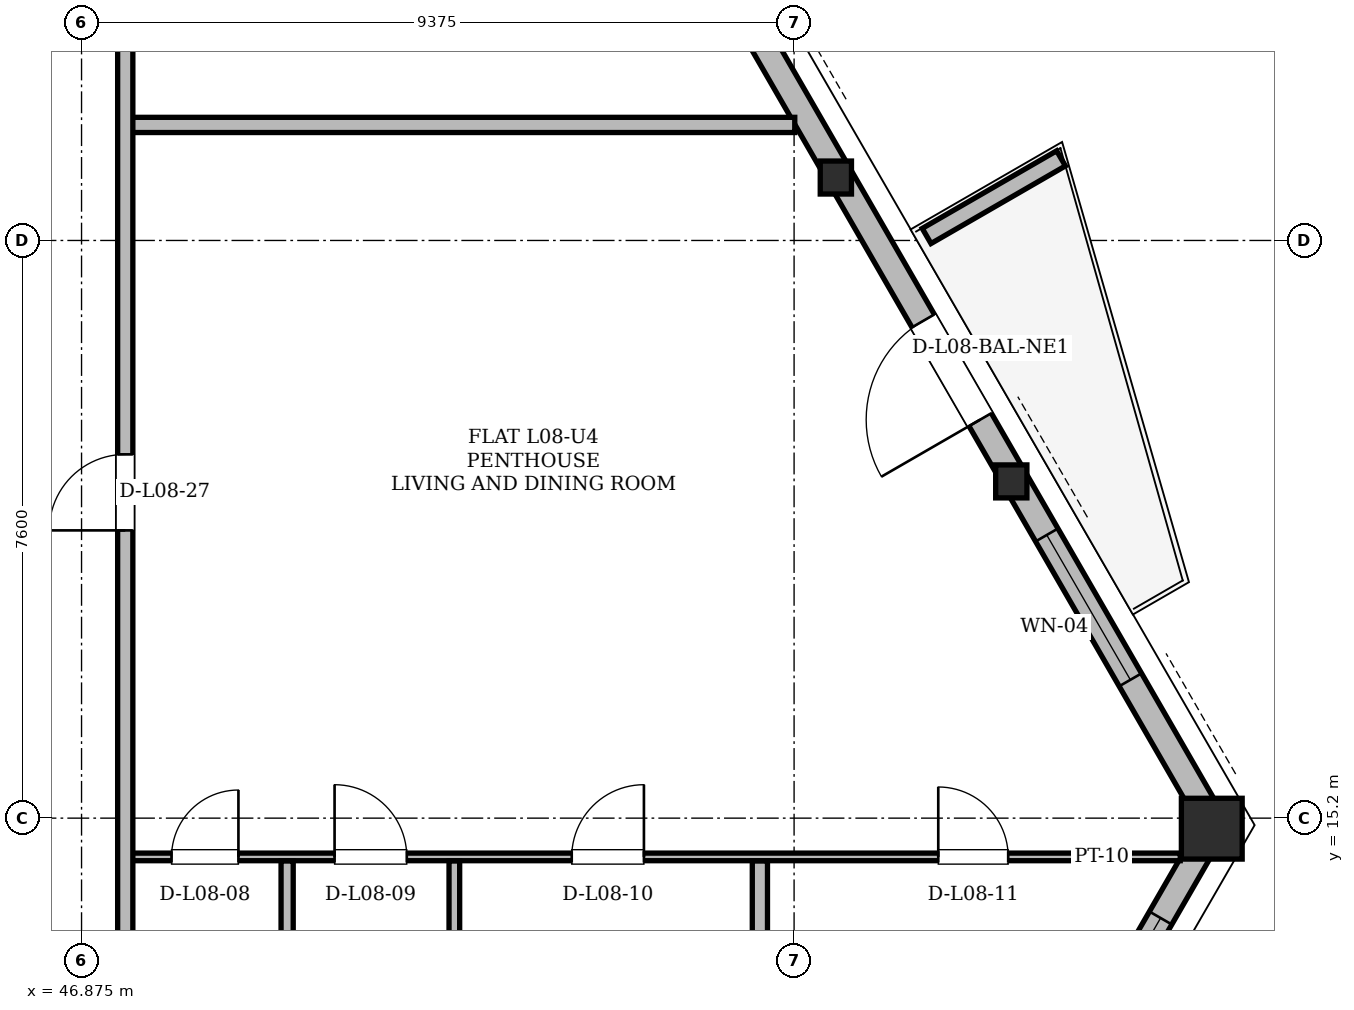
"""IFC4 building model, lengths in metres.
Left out: names, types, materials, properties, quantities, classifications, styles, units other than length and angle.
Written with IfcOpenShell. Run it as: python <this file> out.ifc"""

import sys

from ifc_helpers import new_model, si_unit, direction, frame, frame_2d, origin, origin_2d, place, context, subcontext, project, spatial, polyline, rectangle, hollow_rectangle, i_section, outline, extrude, element, fill, save


model = new_model("IFC4")
c1 = context("Model", 3, precision=1e-05, world=origin(), true_north=direction((0.0, 1.0)))
c2 = subcontext(c1, "Body", "Model", "MODEL_VIEW")
j1 = project(units=[si_unit("LENGTHUNIT", "METRE"), si_unit("PLANEANGLEUNIT", "RADIAN")], contexts=[c1])
p1 = place(None, origin())
s1 = spatial("IfcSite", under=j1, at=p1, CompositionType="ELEMENT")
p2 = place(p1, origin())
s2 = spatial("IfcBuilding", under=s1, at=p2, CompositionType="ELEMENT")
p3 = place(p2, frame((0.0, 0.0, 34.5)))
s3 = spatial("IfcBuildingStorey", under=s2, at=p3, CompositionType="ELEMENT", Elevation=34.5)
p4 = place(p3, frame((61.778, 15.108, 0.004), z_axis=(-0.018142917842, -0.026229087217, 0.999491305373), x_axis=(0.822422232235, -0.568877554422, 0.0)))
e1 = element("IfcColumn", 1, at=p4, inside=s3, PredefinedType="COLUMN", context=c2, shape_type="SweptSolid", body=[
    extrude(hollow_rectangle(XDim=0.8, YDim=0.8, WallThickness=0.065, at=origin_2d()), origin(), (0.0, 0.0, 1.0), 3.593),
])
p5 = place(p3, frame((59.144, 19.67, 0.004), z_axis=(-0.020318381204, -0.022424969221, 0.999542037205), x_axis=(0.741056784611, -0.67144235939, 0.0)))
e2 = element("IfcColumn", 2, at=p5, inside=s3, PredefinedType="COLUMN", context=c2, shape_type="SweptSolid", body=[
    extrude(i_section(OverallWidth=0.411, OverallDepth=0.434, WebThickness=0.036, FlangeThickness=0.057, at=origin_2d()), origin(), (0.0, 0.0, 1.0), 3.593),
])
p6 = place(p3, frame((56.84, 23.662, 0.004), z_axis=(-0.022221713768, -0.019163679763, 0.999569381692), x_axis=(0.653077047348, -0.757291469797, 0.0)))
e3 = element("IfcColumn", 3, at=p6, inside=s3, PredefinedType="COLUMN", context=c2, shape_type="SweptSolid", body=[
    extrude(i_section(OverallWidth=0.411, OverallDepth=0.434, WebThickness=0.036, FlangeThickness=0.057, at=origin_2d()), origin(), (0.0, 0.0, 1.0), 3.593),
])
p7 = place(p3, frame((53.962, 1.57, 0.0), z_axis=(0.0, 0.0, 1.0), x_axis=(0.499997339613, 0.866026939754, 0.0)))
e4 = element("IfcWall", 4, at=p7, inside=s3, PredefinedType="SOLIDWALL", context=c2, shape_type="SweptSolid", body=[
    extrude(rectangle(XDim=15.632, YDim=0.34, at=frame_2d((7.816, 0.0))), origin(), (0.0, 0.0, 1.0), 2.494),
])
p8 = place(p7, frame((13.371, 0.0, 1.28)))
e5 = element("IfcOpeningElement", 5, at=p8, cuts=e4, PredefinedType="OPENING", context=c2, shape_type="SweptSolid", body=[
    extrude(rectangle(XDim=0.85, YDim=0.92, at=frame_2d((0.425, 0.46))), frame((0.0, 0.17, 0.0), z_axis=(0.0, -1.0, 0.0), x_axis=(1.0, 0.0, 0.0)), (0.0, 0.0, 1.0), 0.34),
])
p9 = place(p3, frame((61.778, 15.108, 0.0), z_axis=(0.0, 0.0, 1.0), x_axis=(-0.499999106891, 0.866025919421, 0.0)))
e6 = element("IfcWall", 6, at=p9, inside=s3, PredefinedType="SOLIDWALL", context=c2, shape_type="SweptSolid", body=[
    extrude(rectangle(XDim=32.924, YDim=0.34, at=frame_2d((16.462, 0.0))), origin(), (0.0, 0.0, 1.0), 2.494),
])
p10 = place(p9, frame((6.159, 0.0, 0.0)))
e7 = element("IfcOpeningElement", 7, at=p10, cuts=e6, PredefinedType="OPENING", context=c2, shape_type="SweptSolid", body=[
    extrude(rectangle(XDim=1.5, YDim=2.2, at=frame_2d((0.75, 1.1))), frame((0.0, 0.17, 0.0), z_axis=(0.0, -1.0, 0.0), x_axis=(1.0, 0.0, 0.0)), (0.0, 0.0, 1.0), 0.34),
])
p11 = place(p9, frame((25.069, 0.0, 0.0)))
e8 = element("IfcOpeningElement", 8, at=p11, cuts=e6, PredefinedType="OPENING", context=c2, shape_type="SweptSolid", body=[
    extrude(rectangle(XDim=1.5, YDim=2.2, at=frame_2d((0.75, 1.1))), frame((0.0, 0.17, 0.0), z_axis=(0.0, -1.0, 0.0), x_axis=(1.0, 0.0, 0.0)), (0.0, 0.0, 1.0), 0.34),
])
p12 = place(p9, frame((2.207, 0.0, 0.85)))
e9 = element("IfcOpeningElement", 9, at=p12, cuts=e6, PredefinedType="OPENING", context=c2, shape_type="SweptSolid", body=[
    extrude(rectangle(XDim=2.2, YDim=1.534, at=frame_2d((1.1, 0.767))), frame((0.0, 0.17, 0.0), z_axis=(0.0, -1.0, 0.0), x_axis=(1.0, 0.0, 0.0)), (0.0, 0.0, 1.0), 0.34),
])
p13 = place(p9, frame((12.558, 0.0, 0.85)))
e10 = element("IfcOpeningElement", 10, at=p13, cuts=e6, PredefinedType="OPENING", context=c2, shape_type="SweptSolid", body=[
    extrude(rectangle(XDim=2.0, YDim=1.534, at=frame_2d((1.0, 0.767))), frame((0.0, 0.17, 0.0), z_axis=(0.0, -1.0, 0.0), x_axis=(1.0, 0.0, 0.0)), (0.0, 0.0, 1.0), 0.34),
])
p14 = place(p9, frame((19.845, 0.0, 0.85)))
e11 = element("IfcOpeningElement", 11, at=p14, cuts=e6, PredefinedType="OPENING", context=c2, shape_type="SweptSolid", body=[
    extrude(rectangle(XDim=1.4, YDim=1.534, at=frame_2d((0.7, 0.767))), frame((0.0, 0.17, 0.0), z_axis=(0.0, -1.0, 0.0), x_axis=(1.0, 0.0, 0.0)), (0.0, 0.0, 1.0), 0.34),
])
p15 = place(p9, frame((30.606, 0.0, 0.85)))
e12 = element("IfcOpeningElement", 12, at=p15, cuts=e6, PredefinedType="OPENING", context=c2, shape_type="SweptSolid", body=[
    extrude(rectangle(XDim=1.2, YDim=1.48, at=frame_2d((0.6, 0.74))), frame((0.0, 0.17, 0.0), z_axis=(0.0, -1.0, 0.0), x_axis=(1.0, 0.0, 0.0)), (0.0, 0.0, 1.0), 0.34),
])
p16 = place(p3, frame((57.994, 22.859, 0.0), z_axis=(0.0, 0.0, 1.0), x_axis=(0.866012356593, 0.500022597718, 0.0)))
e13 = element("IfcWall", 13, at=p16, inside=s3, PredefinedType="PARAPET", context=c2, shape_type="SweptSolid", body=[
    extrude(outline(polyline([(0.0, 0.0), (2.042, 0.0), (2.042, 1.1), (0.0, 1.32), (0.0, 0.0)])), frame((0.0, 0.115, 0.0), z_axis=(0.0, -1.0, 0.0), x_axis=(1.0, 0.0, 0.0)), (0.0, 0.0, 1.0), 0.23),
])
p17 = place(p3, frame((47.4, 14.69, 0.0), z_axis=(0.0, 0.0, 1.0), x_axis=(1.0, 0.0, 0.0)))
e14 = element("IfcWall", 14, at=p17, inside=s3, PredefinedType="PARTITIONING", context=c2, shape_type="SweptSolid", body=[
    extrude(rectangle(XDim=13.931, YDim=0.1, at=frame_2d((6.965, 0.0))), origin(), (0.0, 0.0, 1.0), 2.738),
])
p18 = place(p17, frame((0.659, 0.0, 0.0)))
e15 = element("IfcOpeningElement", 15, at=p18, cuts=e14, PredefinedType="OPENING", context=c2, shape_type="SweptSolid", body=[
    extrude(rectangle(XDim=0.88, YDim=2.08, at=frame_2d((0.44, 1.04))), frame((0.0, 0.05, 0.0), z_axis=(0.0, -1.0, 0.0), x_axis=(1.0, 0.0, 0.0)), (0.0, 0.0, 1.0), 0.1),
])
p19 = place(p17, frame((2.804, 0.0, 0.0)))
e16 = element("IfcOpeningElement", 16, at=p19, cuts=e14, PredefinedType="OPENING", context=c2, shape_type="SweptSolid", body=[
    extrude(rectangle(XDim=0.95, YDim=2.1, at=frame_2d((0.475, 1.05))), frame((0.0, 0.05, 0.0), z_axis=(0.0, -1.0, 0.0), x_axis=(1.0, 0.0, 0.0)), (0.0, 0.0, 1.0), 0.1),
])
p20 = place(p17, frame((5.924, 0.0, 0.0)))
e17 = element("IfcOpeningElement", 17, at=p20, cuts=e14, PredefinedType="OPENING", context=c2, shape_type="SweptSolid", body=[
    extrude(rectangle(XDim=0.95, YDim=2.1, at=frame_2d((0.475, 1.05))), frame((0.0, 0.05, 0.0), z_axis=(0.0, -1.0, 0.0), x_axis=(1.0, 0.0, 0.0)), (0.0, 0.0, 1.0), 0.1),
])
p21 = place(p17, frame((10.747, 0.0, 0.0)))
e18 = element("IfcOpeningElement", 18, at=p21, cuts=e14, PredefinedType="OPENING", context=c2, shape_type="SweptSolid", body=[
    extrude(rectangle(XDim=0.92, YDim=2.12, at=frame_2d((0.46, 1.06))), frame((0.0, 0.05, 0.0), z_axis=(0.0, -1.0, 0.0), x_axis=(1.0, 0.0, 0.0)), (0.0, 0.0, 1.0), 0.1),
])
p22 = place(p3, frame((47.45, 24.32, 0.0), z_axis=(0.0, 0.0, 1.0), x_axis=(1.0, 0.0, 0.0)))
e19 = element("IfcWall", 19, at=p22, inside=s3, PredefinedType="PARTITIONING", context=c2, shape_type="SweptSolid", body=[
    extrude(rectangle(XDim=8.809, YDim=0.2, at=frame_2d((4.404, 0.0))), origin(), (0.0, 0.0, 1.0), 2.494),
])
p23 = place(p3, frame((47.45, 11.054, 0.0), z_axis=(0.0, 0.0, 1.0), x_axis=(0.0, 1.0, 0.0)))
e20 = element("IfcWall", 20, at=p23, inside=s3, PredefinedType="PARTITIONING", context=c2, shape_type="SweptSolid", body=[
    extrude(rectangle(XDim=14.812, YDim=0.2, at=frame_2d((7.406, 0.0))), origin(), (0.0, 0.0, 1.0), 2.738),
])
p24 = place(p23, frame((7.932, 0.0, 0.0)))
e21 = element("IfcOpeningElement", 21, at=p24, cuts=e20, PredefinedType="OPENING", context=c2, shape_type="SweptSolid", body=[
    extrude(rectangle(XDim=1.0, YDim=2.18, at=frame_2d((0.5, 1.09))), frame((0.0, 0.1, 0.0), z_axis=(0.0, -1.0, 0.0), x_axis=(1.0, 0.0, 0.0)), (0.0, 0.0, 1.0), 0.2),
])
p25 = place(p3, frame((49.58, 11.054, 0.0), z_axis=(0.0, 0.0, 1.0), x_axis=(0.0, 1.0, 0.0)))
e22 = element("IfcWall", 22, at=p25, inside=s3, PredefinedType="PARTITIONING", context=c2, shape_type="SweptSolid", body=[
    extrude(rectangle(XDim=3.582, YDim=0.16, at=frame_2d((1.791, 0.0))), origin(), (0.0, 0.0, 1.0), 2.738),
])
p26 = place(p3, frame((51.78, 11.054, 0.0), z_axis=(0.0, 0.0, 1.0), x_axis=(0.0, 1.0, 0.0)))
e23 = element("IfcWall", 23, at=p26, inside=s3, PredefinedType="PARTITIONING", context=c2, shape_type="SweptSolid", body=[
    extrude(rectangle(XDim=3.582, YDim=0.14, at=frame_2d((1.791, 0.0))), origin(), (0.0, 0.0, 1.0), 2.738),
])
p27 = place(p3, frame((55.8, 9.404, 0.0), z_axis=(0.0, 0.0, 1.0), x_axis=(0.0, 1.0, 0.0)))
e24 = element("IfcWall", 24, at=p27, inside=s3, PredefinedType="PARTITIONING", context=c2, shape_type="SweptSolid", body=[
    extrude(rectangle(XDim=5.232, YDim=0.2, at=frame_2d((2.616, 0.0))), origin(), (0.0, 0.0, 1.0), 2.738),
])
p28 = place(p10, origin())
e25 = element("IfcDoor", 25, at=p28, inside=s3, OperationType="SINGLE_SWING_LEFT", PredefinedType="DOOR", context=c2, shape_type="SweptSolid", body=[
    extrude(rectangle(XDim=1.5, YDim=2.2, at=frame_2d((0.75, 1.1))), frame((0.0, 0.025, 0.0), z_axis=(0.0, -1.0, 0.0), x_axis=(1.0, 0.0, 0.0)), (0.0, 0.0, 1.0), 0.05),
])
fill(e7, e25)
p29 = place(p12, origin())
e26 = element("IfcWindow", 26, at=p29, inside=s3, PartitioningType="SINGLE_PANEL", PredefinedType="WINDOW", context=c2, shape_type="SweptSolid", body=[
    extrude(rectangle(XDim=2.2, YDim=1.534, at=frame_2d((1.1, 0.767))), frame((0.0, 0.03, 0.0), z_axis=(0.0, -1.0, 0.0), x_axis=(1.0, 0.0, 0.0)), (0.0, 0.0, 1.0), 0.06),
])
fill(e9, e26)
p30 = place(p8, origin())
e27 = element("IfcWindow", 27, at=p30, inside=s3, PartitioningType="SINGLE_PANEL", PredefinedType="WINDOW", context=c2, shape_type="SweptSolid", body=[
    extrude(rectangle(XDim=0.85, YDim=0.92, at=frame_2d((0.425, 0.46))), frame((0.0, 0.03, 0.0), z_axis=(0.0, -1.0, 0.0), x_axis=(1.0, 0.0, 0.0)), (0.0, 0.0, 1.0), 0.06),
])
fill(e5, e27)
p31 = place(p18, origin())
e28 = element("IfcDoor", 28, at=p31, inside=s3, OperationType="SINGLE_SWING_RIGHT", PredefinedType="DOOR", context=c2, shape_type="SweptSolid", body=[
    extrude(rectangle(XDim=0.88, YDim=2.08, at=frame_2d((0.44, 1.04))), frame((0.0, 0.025, 0.0), z_axis=(0.0, -1.0, 0.0), x_axis=(1.0, 0.0, 0.0)), (0.0, 0.0, 1.0), 0.05),
])
fill(e15, e28)
p32 = place(p19, origin())
e29 = element("IfcDoor", 29, at=p32, inside=s3, OperationType="SINGLE_SWING_LEFT", PredefinedType="DOOR", context=c2, shape_type="SweptSolid", body=[
    extrude(rectangle(XDim=0.95, YDim=2.1, at=frame_2d((0.475, 1.05))), frame((0.0, 0.025, 0.0), z_axis=(0.0, -1.0, 0.0), x_axis=(1.0, 0.0, 0.0)), (0.0, 0.0, 1.0), 0.05),
])
fill(e16, e29)
p33 = place(p20, origin())
e30 = element("IfcDoor", 30, at=p33, inside=s3, OperationType="SINGLE_SWING_RIGHT", PredefinedType="DOOR", context=c2, shape_type="SweptSolid", body=[
    extrude(rectangle(XDim=0.95, YDim=2.1, at=frame_2d((0.475, 1.05))), frame((0.0, 0.025, 0.0), z_axis=(0.0, -1.0, 0.0), x_axis=(1.0, 0.0, 0.0)), (0.0, 0.0, 1.0), 0.05),
])
fill(e17, e30)
p34 = place(p21, origin())
e31 = element("IfcDoor", 31, at=p34, inside=s3, OperationType="SINGLE_SWING_LEFT", PredefinedType="DOOR", context=c2, shape_type="SweptSolid", body=[
    extrude(rectangle(XDim=0.92, YDim=2.12, at=frame_2d((0.46, 1.06))), frame((0.0, 0.025, 0.0), z_axis=(0.0, -1.0, 0.0), x_axis=(1.0, 0.0, 0.0)), (0.0, 0.0, 1.0), 0.05),
])
fill(e18, e31)
p35 = place(p24, origin())
e32 = element("IfcDoor", 32, at=p35, inside=s3, OperationType="SINGLE_SWING_LEFT", PredefinedType="DOOR", context=c2, shape_type="SweptSolid", body=[
    extrude(rectangle(XDim=1.0, YDim=2.18, at=frame_2d((0.5, 1.09))), frame((0.0, 0.025, 0.0), z_axis=(0.0, -1.0, 0.0), x_axis=(1.0, 0.0, 0.0)), (0.0, 0.0, 1.0), 0.05),
])
fill(e21, e32)
save(model, sys.argv[1])
